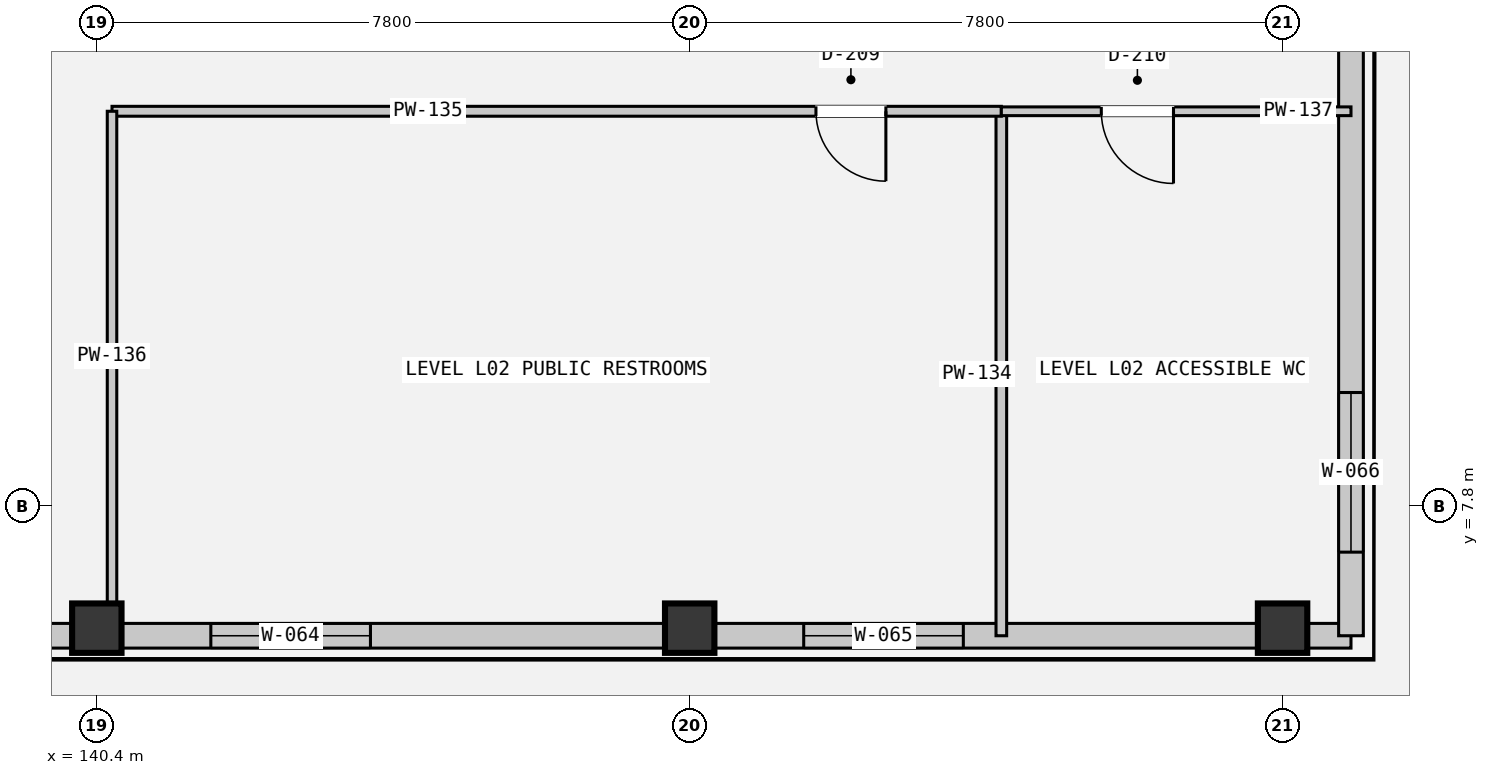
"""IFC4 building model, lengths in metres.
Left out: names, types, materials, properties, quantities, classifications, styles, units other than length and angle.
Written with IfcOpenShell. Run it as: python <this file> out.ifc"""

import sys

from ifc_helpers import new_model, si_unit, direction, frame, frame_2d, origin, origin_2d, place, context, subcontext, project, spatial, rectangle, extrude, element, fill, save


model = new_model("IFC4")
c1 = context("Model", 3, precision=1e-05, world=origin(), true_north=direction((0.0, 1.0)))
c2 = subcontext(c1, "Body", "Model", "MODEL_VIEW")
j1 = project(units=[si_unit("LENGTHUNIT", "METRE"), si_unit("PLANEANGLEUNIT", "RADIAN")], contexts=[c1])
p1 = place(None, origin())
s1 = spatial("IfcSite", under=j1, at=p1, CompositionType="ELEMENT")
p2 = place(p1, origin())
s2 = spatial("IfcBuilding", under=s1, at=p2, CompositionType="ELEMENT")
p3 = place(p2, frame((0.0, 0.0, 10.2)))
s3 = spatial("IfcBuildingStorey", under=s2, at=p3, CompositionType="ELEMENT", Elevation=10.2)
for number, where, z_axis, x_axis in (
    (1, (140.4, 6.2, 0.0), (0.0, 0.0, 1.0), (1.0, 0.0, 0.0)),
    (2, (148.2, 6.2, 0.0), (0.0, 0.0, 1.0), (1.0, 0.0, 0.0)),
    (3, (156.0, 6.2, 0.0), (0.0, 0.0, 1.0), (1.0, 0.0, 0.0)),
):
    element("IfcColumn", number, at=place(p3, frame(where, z_axis=z_axis, x_axis=x_axis)), inside=s3, PredefinedType="COLUMN", context=c2, shape_type="SweptSolid", body=[
        extrude(rectangle(XDim=0.65, YDim=0.65, at=origin_2d()), origin(), (0.0, 0.0, 1.0), 4.8),
    ])
p4 = place(p3, frame((78.4, 6.1, 0.0), z_axis=(0.0, 0.0, 1.0), x_axis=(1.0, 0.0, 0.0)))
e4 = element("IfcWall", 4, at=p4, inside=s3, PredefinedType="SOLIDWALL", context=c2, shape_type="SweptSolid", body=[
    extrude(rectangle(XDim=78.5, YDim=0.325, at=frame_2d((39.25, 0.0))), origin(), (0.0, 0.0, 1.0), 3.86),
])
p5 = place(p4, frame((1.1, 0.0, 0.78)))
e5 = element("IfcOpeningElement", 5, at=p5, cuts=e4, PredefinedType="OPENING", context=c2, shape_type="SweptSolid", body=[
    extrude(rectangle(XDim=2.1, YDim=2.6, at=frame_2d((1.05, 1.3))), frame((0.0, 0.172, 0.0), z_axis=(0.0, -1.0, 0.0), x_axis=(1.0, 0.0, 0.0)), (0.0, 0.0, 1.0), 0.345),
])
p6 = place(p4, frame((8.9, 0.0, 0.78)))
e6 = element("IfcOpeningElement", 6, at=p6, cuts=e4, PredefinedType="OPENING", context=c2, shape_type="SweptSolid", body=[
    extrude(rectangle(XDim=2.1, YDim=2.6, at=frame_2d((1.05, 1.3))), frame((0.0, 0.172, 0.0), z_axis=(0.0, -1.0, 0.0), x_axis=(1.0, 0.0, 0.0)), (0.0, 0.0, 1.0), 0.345),
])
p7 = place(p4, frame((16.7, 0.0, 0.78)))
e7 = element("IfcOpeningElement", 7, at=p7, cuts=e4, PredefinedType="OPENING", context=c2, shape_type="SweptSolid", body=[
    extrude(rectangle(XDim=2.1, YDim=2.6, at=frame_2d((1.05, 1.3))), frame((0.0, 0.172, 0.0), z_axis=(0.0, -1.0, 0.0), x_axis=(1.0, 0.0, 0.0)), (0.0, 0.0, 1.0), 0.345),
])
p8 = place(p4, frame((24.5, 0.0, 0.78)))
e8 = element("IfcOpeningElement", 8, at=p8, cuts=e4, PredefinedType="OPENING", context=c2, shape_type="SweptSolid", body=[
    extrude(rectangle(XDim=2.1, YDim=2.6, at=frame_2d((1.05, 1.3))), frame((0.0, 0.172, 0.0), z_axis=(0.0, -1.0, 0.0), x_axis=(1.0, 0.0, 0.0)), (0.0, 0.0, 1.0), 0.345),
])
p9 = place(p4, frame((32.3, 0.0, 0.78)))
e9 = element("IfcOpeningElement", 9, at=p9, cuts=e4, PredefinedType="OPENING", context=c2, shape_type="SweptSolid", body=[
    extrude(rectangle(XDim=2.1, YDim=2.6, at=frame_2d((1.05, 1.3))), frame((0.0, 0.172, 0.0), z_axis=(0.0, -1.0, 0.0), x_axis=(1.0, 0.0, 0.0)), (0.0, 0.0, 1.0), 0.345),
])
p10 = place(p4, frame((40.1, 0.0, 0.78)))
e10 = element("IfcOpeningElement", 10, at=p10, cuts=e4, PredefinedType="OPENING", context=c2, shape_type="SweptSolid", body=[
    extrude(rectangle(XDim=2.1, YDim=2.6, at=frame_2d((1.05, 1.3))), frame((0.0, 0.172, 0.0), z_axis=(0.0, -1.0, 0.0), x_axis=(1.0, 0.0, 0.0)), (0.0, 0.0, 1.0), 0.345),
])
p11 = place(p4, frame((47.9, 0.0, 0.78)))
e11 = element("IfcOpeningElement", 11, at=p11, cuts=e4, PredefinedType="OPENING", context=c2, shape_type="SweptSolid", body=[
    extrude(rectangle(XDim=2.1, YDim=2.6, at=frame_2d((1.05, 1.3))), frame((0.0, 0.172, 0.0), z_axis=(0.0, -1.0, 0.0), x_axis=(1.0, 0.0, 0.0)), (0.0, 0.0, 1.0), 0.345),
])
p12 = place(p4, frame((55.7, 0.0, 0.78)))
e12 = element("IfcOpeningElement", 12, at=p12, cuts=e4, PredefinedType="OPENING", context=c2, shape_type="SweptSolid", body=[
    extrude(rectangle(XDim=2.1, YDim=2.6, at=frame_2d((1.05, 1.3))), frame((0.0, 0.172, 0.0), z_axis=(0.0, -1.0, 0.0), x_axis=(1.0, 0.0, 0.0)), (0.0, 0.0, 1.0), 0.345),
])
p13 = place(p4, frame((63.5, 0.0, 0.78)))
e13 = element("IfcOpeningElement", 13, at=p13, cuts=e4, PredefinedType="OPENING", context=c2, shape_type="SweptSolid", body=[
    extrude(rectangle(XDim=2.1, YDim=2.6, at=frame_2d((1.05, 1.3))), frame((0.0, 0.172, 0.0), z_axis=(0.0, -1.0, 0.0), x_axis=(1.0, 0.0, 0.0)), (0.0, 0.0, 1.0), 0.345),
])
p14 = place(p4, frame((71.3, 0.0, 0.78)))
e14 = element("IfcOpeningElement", 14, at=p14, cuts=e4, PredefinedType="OPENING", context=c2, shape_type="SweptSolid", body=[
    extrude(rectangle(XDim=2.1, YDim=2.6, at=frame_2d((1.05, 1.3))), frame((0.0, 0.172, 0.0), z_axis=(0.0, -1.0, 0.0), x_axis=(1.0, 0.0, 0.0)), (0.0, 0.0, 1.0), 0.345),
])
p15 = place(p3, frame((156.9, 6.1, 0.0), z_axis=(0.0, 0.0, 1.0), x_axis=(0.0, 1.0, 0.0)))
e15 = element("IfcWall", 15, at=p15, inside=s3, PredefinedType="SOLIDWALL", context=c2, shape_type="SweptSolid", body=[
    extrude(rectangle(XDim=102.7, YDim=0.325, at=frame_2d((51.35, 0.0))), origin(), (0.0, 0.0, 1.0), 3.86),
])
p16 = place(p15, frame((1.1, 0.0, 0.78)))
e16 = element("IfcOpeningElement", 16, at=p16, cuts=e15, PredefinedType="OPENING", context=c2, shape_type="SweptSolid", body=[
    extrude(rectangle(XDim=2.1, YDim=2.6, at=frame_2d((1.05, 1.3))), frame((0.0, 0.172, 0.0), z_axis=(0.0, -1.0, 0.0), x_axis=(1.0, 0.0, 0.0)), (0.0, 0.0, 1.0), 0.345),
])
p17 = place(p15, frame((12.8, 0.0, 0.78)))
e17 = element("IfcOpeningElement", 17, at=p17, cuts=e15, PredefinedType="OPENING", context=c2, shape_type="SweptSolid", body=[
    extrude(rectangle(XDim=2.1, YDim=2.6, at=frame_2d((1.05, 1.3))), frame((0.0, 0.172, 0.0), z_axis=(0.0, -1.0, 0.0), x_axis=(1.0, 0.0, 0.0)), (0.0, 0.0, 1.0), 0.345),
])
p18 = place(p15, frame((20.6, 0.0, 0.78)))
e18 = element("IfcOpeningElement", 18, at=p18, cuts=e15, PredefinedType="OPENING", context=c2, shape_type="SweptSolid", body=[
    extrude(rectangle(XDim=2.1, YDim=2.6, at=frame_2d((1.05, 1.3))), frame((0.0, 0.172, 0.0), z_axis=(0.0, -1.0, 0.0), x_axis=(1.0, 0.0, 0.0)), (0.0, 0.0, 1.0), 0.345),
])
p19 = place(p15, frame((24.5, 0.0, 0.78)))
e19 = element("IfcOpeningElement", 19, at=p19, cuts=e15, PredefinedType="OPENING", context=c2, shape_type="SweptSolid", body=[
    extrude(rectangle(XDim=2.1, YDim=2.6, at=frame_2d((1.05, 1.3))), frame((0.0, 0.172, 0.0), z_axis=(0.0, -1.0, 0.0), x_axis=(1.0, 0.0, 0.0)), (0.0, 0.0, 1.0), 0.345),
])
p20 = place(p15, frame((28.4, 0.0, 0.78)))
e20 = element("IfcOpeningElement", 20, at=p20, cuts=e15, PredefinedType="OPENING", context=c2, shape_type="SweptSolid", body=[
    extrude(rectangle(XDim=2.1, YDim=2.6, at=frame_2d((1.05, 1.3))), frame((0.0, 0.172, 0.0), z_axis=(0.0, -1.0, 0.0), x_axis=(1.0, 0.0, 0.0)), (0.0, 0.0, 1.0), 0.345),
])
p21 = place(p15, frame((32.3, 0.0, 0.78)))
e21 = element("IfcOpeningElement", 21, at=p21, cuts=e15, PredefinedType="OPENING", context=c2, shape_type="SweptSolid", body=[
    extrude(rectangle(XDim=2.1, YDim=2.6, at=frame_2d((1.05, 1.3))), frame((0.0, 0.172, 0.0), z_axis=(0.0, -1.0, 0.0), x_axis=(1.0, 0.0, 0.0)), (0.0, 0.0, 1.0), 0.345),
])
p22 = place(p15, frame((36.2, 0.0, 0.78)))
e22 = element("IfcOpeningElement", 22, at=p22, cuts=e15, PredefinedType="OPENING", context=c2, shape_type="SweptSolid", body=[
    extrude(rectangle(XDim=2.1, YDim=2.6, at=frame_2d((1.05, 1.3))), frame((0.0, 0.172, 0.0), z_axis=(0.0, -1.0, 0.0), x_axis=(1.0, 0.0, 0.0)), (0.0, 0.0, 1.0), 0.345),
])
p23 = place(p15, frame((40.1, 0.0, 0.78)))
e23 = element("IfcOpeningElement", 23, at=p23, cuts=e15, PredefinedType="OPENING", context=c2, shape_type="SweptSolid", body=[
    extrude(rectangle(XDim=2.1, YDim=2.6, at=frame_2d((1.05, 1.3))), frame((0.0, 0.172, 0.0), z_axis=(0.0, -1.0, 0.0), x_axis=(1.0, 0.0, 0.0)), (0.0, 0.0, 1.0), 0.345),
])
p24 = place(p15, frame((47.9, 0.0, 0.78)))
e24 = element("IfcOpeningElement", 24, at=p24, cuts=e15, PredefinedType="OPENING", context=c2, shape_type="SweptSolid", body=[
    extrude(rectangle(XDim=2.1, YDim=2.6, at=frame_2d((1.05, 1.3))), frame((0.0, 0.172, 0.0), z_axis=(0.0, -1.0, 0.0), x_axis=(1.0, 0.0, 0.0)), (0.0, 0.0, 1.0), 0.345),
])
p25 = place(p15, frame((51.8, 0.0, 0.78)))
e25 = element("IfcOpeningElement", 25, at=p25, cuts=e15, PredefinedType="OPENING", context=c2, shape_type="SweptSolid", body=[
    extrude(rectangle(XDim=2.1, YDim=2.6, at=frame_2d((1.05, 1.3))), frame((0.0, 0.172, 0.0), z_axis=(0.0, -1.0, 0.0), x_axis=(1.0, 0.0, 0.0)), (0.0, 0.0, 1.0), 0.345),
])
p26 = place(p15, frame((55.7, 0.0, 0.78)))
e26 = element("IfcOpeningElement", 26, at=p26, cuts=e15, PredefinedType="OPENING", context=c2, shape_type="SweptSolid", body=[
    extrude(rectangle(XDim=2.1, YDim=2.6, at=frame_2d((1.05, 1.3))), frame((0.0, 0.172, 0.0), z_axis=(0.0, -1.0, 0.0), x_axis=(1.0, 0.0, 0.0)), (0.0, 0.0, 1.0), 0.345),
])
p27 = place(p15, frame((59.6, 0.0, 0.78)))
e27 = element("IfcOpeningElement", 27, at=p27, cuts=e15, PredefinedType="OPENING", context=c2, shape_type="SweptSolid", body=[
    extrude(rectangle(XDim=2.1, YDim=2.6, at=frame_2d((1.05, 1.3))), frame((0.0, 0.172, 0.0), z_axis=(0.0, -1.0, 0.0), x_axis=(1.0, 0.0, 0.0)), (0.0, 0.0, 1.0), 0.345),
])
p28 = place(p15, frame((63.5, 0.0, 0.78)))
e28 = element("IfcOpeningElement", 28, at=p28, cuts=e15, PredefinedType="OPENING", context=c2, shape_type="SweptSolid", body=[
    extrude(rectangle(XDim=2.1, YDim=2.6, at=frame_2d((1.05, 1.3))), frame((0.0, 0.172, 0.0), z_axis=(0.0, -1.0, 0.0), x_axis=(1.0, 0.0, 0.0)), (0.0, 0.0, 1.0), 0.345),
])
p29 = place(p15, frame((71.3, 0.0, 0.78)))
e29 = element("IfcOpeningElement", 29, at=p29, cuts=e15, PredefinedType="OPENING", context=c2, shape_type="SweptSolid", body=[
    extrude(rectangle(XDim=2.1, YDim=2.6, at=frame_2d((1.05, 1.3))), frame((0.0, 0.172, 0.0), z_axis=(0.0, -1.0, 0.0), x_axis=(1.0, 0.0, 0.0)), (0.0, 0.0, 1.0), 0.345),
])
p30 = place(p15, frame((75.2, 0.0, 0.78)))
e30 = element("IfcOpeningElement", 30, at=p30, cuts=e15, PredefinedType="OPENING", context=c2, shape_type="SweptSolid", body=[
    extrude(rectangle(XDim=2.1, YDim=2.6, at=frame_2d((1.05, 1.3))), frame((0.0, 0.172, 0.0), z_axis=(0.0, -1.0, 0.0), x_axis=(1.0, 0.0, 0.0)), (0.0, 0.0, 1.0), 0.345),
])
p31 = place(p15, frame((79.1, 0.0, 0.78)))
e31 = element("IfcOpeningElement", 31, at=p31, cuts=e15, PredefinedType="OPENING", context=c2, shape_type="SweptSolid", body=[
    extrude(rectangle(XDim=2.1, YDim=2.6, at=frame_2d((1.05, 1.3))), frame((0.0, 0.172, 0.0), z_axis=(0.0, -1.0, 0.0), x_axis=(1.0, 0.0, 0.0)), (0.0, 0.0, 1.0), 0.345),
])
p32 = place(p15, frame((83.0, 0.0, 0.78)))
e32 = element("IfcOpeningElement", 32, at=p32, cuts=e15, PredefinedType="OPENING", context=c2, shape_type="SweptSolid", body=[
    extrude(rectangle(XDim=2.1, YDim=2.6, at=frame_2d((1.05, 1.3))), frame((0.0, 0.172, 0.0), z_axis=(0.0, -1.0, 0.0), x_axis=(1.0, 0.0, 0.0)), (0.0, 0.0, 1.0), 0.345),
])
p33 = place(p15, frame((90.8, 0.0, 0.78)))
e33 = element("IfcOpeningElement", 33, at=p33, cuts=e15, PredefinedType="OPENING", context=c2, shape_type="SweptSolid", body=[
    extrude(rectangle(XDim=2.1, YDim=2.6, at=frame_2d((1.05, 1.3))), frame((0.0, 0.172, 0.0), z_axis=(0.0, -1.0, 0.0), x_axis=(1.0, 0.0, 0.0)), (0.0, 0.0, 1.0), 0.345),
])
p34 = place(p3, frame((152.3, 6.1, 0.0), z_axis=(0.0, 0.0, 1.0), x_axis=(0.0, 1.0, 0.0)))
e34 = element("IfcWall", 34, at=p34, inside=s3, PredefinedType="PARTITIONING", context=c2, shape_type="SweptSolid", body=[
    extrude(rectangle(XDim=6.9, YDim=0.14, at=frame_2d((3.45, 0.0))), origin(), (0.0, 0.0, 1.0), 3.45),
])
p35 = place(p3, frame((152.3, 13.0, 0.0), z_axis=(0.0, 0.0, 1.0), x_axis=(-1.0, 0.0, 0.0)))
e35 = element("IfcWall", 35, at=p35, inside=s3, PredefinedType="PARTITIONING", context=c2, shape_type="SweptSolid", body=[
    extrude(rectangle(XDim=11.7, YDim=0.13, at=frame_2d((5.85, 0.0))), origin(), (0.0, 0.0, 1.0), 3.45),
])
p36 = place(p35, frame((1.519, 0.0, 0.0)))
e36 = element("IfcOpeningElement", 36, at=p36, cuts=e35, PredefinedType="OPENING", context=c2, shape_type="SweptSolid", body=[
    extrude(rectangle(XDim=0.92, YDim=2.1, at=frame_2d((0.46, 1.05))), frame((0.0, 0.075, 0.0), z_axis=(0.0, -1.0, 0.0), x_axis=(1.0, 0.0, 0.0)), (0.0, 0.0, 1.0), 0.15),
])
p37 = place(p3, frame((140.6, 13.0, 0.0), z_axis=(0.0, 0.0, 1.0), x_axis=(0.0, -1.0, 0.0)))
e37 = element("IfcWall", 37, at=p37, inside=s3, PredefinedType="PARTITIONING", context=c2, shape_type="SweptSolid", body=[
    extrude(rectangle(XDim=6.9, YDim=0.125, at=frame_2d((3.45, 0.0))), origin(), (0.0, 0.0, 1.0), 3.45),
])
p38 = place(p3, frame((156.9, 13.0, 0.0), z_axis=(0.0, 0.0, 1.0), x_axis=(-1.0, 0.0, 0.0)))
e38 = element("IfcWall", 38, at=p38, inside=s3, PredefinedType="PARTITIONING", context=c2, shape_type="SweptSolid", body=[
    extrude(rectangle(XDim=4.6, YDim=0.115, at=frame_2d((2.3, 0.0))), origin(), (0.0, 0.0, 1.0), 3.45),
])
p39 = place(p38, frame((2.335, 0.0, 0.0)))
e39 = element("IfcOpeningElement", 39, at=p39, cuts=e38, PredefinedType="OPENING", context=c2, shape_type="SweptSolid", body=[
    extrude(rectangle(XDim=0.95, YDim=2.1, at=frame_2d((0.475, 1.05))), frame((0.0, 0.067, 0.0), z_axis=(0.0, -1.0, 0.0), x_axis=(1.0, 0.0, 0.0)), (0.0, 0.0, 1.0), 0.135),
])
p40 = place(p13, origin())
e40 = element("IfcWindow", 40, at=p40, inside=s3, PartitioningType="SINGLE_PANEL", PredefinedType="WINDOW", context=c2, shape_type="SweptSolid", body=[
    extrude(rectangle(XDim=2.1, YDim=2.6, at=frame_2d((1.05, 1.3))), frame((0.0, 0.03, 0.0), z_axis=(0.0, -1.0, 0.0), x_axis=(1.0, 0.0, 0.0)), (0.0, 0.0, 1.0), 0.06),
])
fill(e13, e40)
p41 = place(p14, origin())
e41 = element("IfcWindow", 41, at=p41, inside=s3, PartitioningType="SINGLE_PANEL", PredefinedType="WINDOW", context=c2, shape_type="SweptSolid", body=[
    extrude(rectangle(XDim=2.1, YDim=2.6, at=frame_2d((1.05, 1.3))), frame((0.0, 0.03, 0.0), z_axis=(0.0, -1.0, 0.0), x_axis=(1.0, 0.0, 0.0)), (0.0, 0.0, 1.0), 0.06),
])
fill(e14, e41)
p42 = place(p16, origin())
e42 = element("IfcWindow", 42, at=p42, inside=s3, PartitioningType="SINGLE_PANEL", PredefinedType="WINDOW", context=c2, shape_type="SweptSolid", body=[
    extrude(rectangle(XDim=2.1, YDim=2.6, at=frame_2d((1.05, 1.3))), frame((0.0, 0.03, 0.0), z_axis=(0.0, -1.0, 0.0), x_axis=(1.0, 0.0, 0.0)), (0.0, 0.0, 1.0), 0.06),
])
fill(e16, e42)
p43 = place(p36, origin())
e43 = element("IfcDoor", 43, at=p43, inside=s3, OperationType="SINGLE_SWING_RIGHT", PredefinedType="DOOR", context=c2, shape_type="SweptSolid", body=[
    extrude(rectangle(XDim=0.92, YDim=2.1, at=frame_2d((0.46, 1.05))), frame((0.0, 0.025, 0.0), z_axis=(0.0, -1.0, 0.0), x_axis=(1.0, 0.0, 0.0)), (0.0, 0.0, 1.0), 0.05),
])
fill(e36, e43)
p44 = place(p39, origin())
e44 = element("IfcDoor", 44, at=p44, inside=s3, OperationType="SINGLE_SWING_LEFT", PredefinedType="DOOR", context=c2, shape_type="SweptSolid", body=[
    extrude(rectangle(XDim=0.95, YDim=2.1, at=frame_2d((0.475, 1.05))), frame((0.0, 0.025, 0.0), z_axis=(0.0, -1.0, 0.0), x_axis=(1.0, 0.0, 0.0)), (0.0, 0.0, 1.0), 0.05),
])
fill(e39, e44)
save(model, sys.argv[1])
